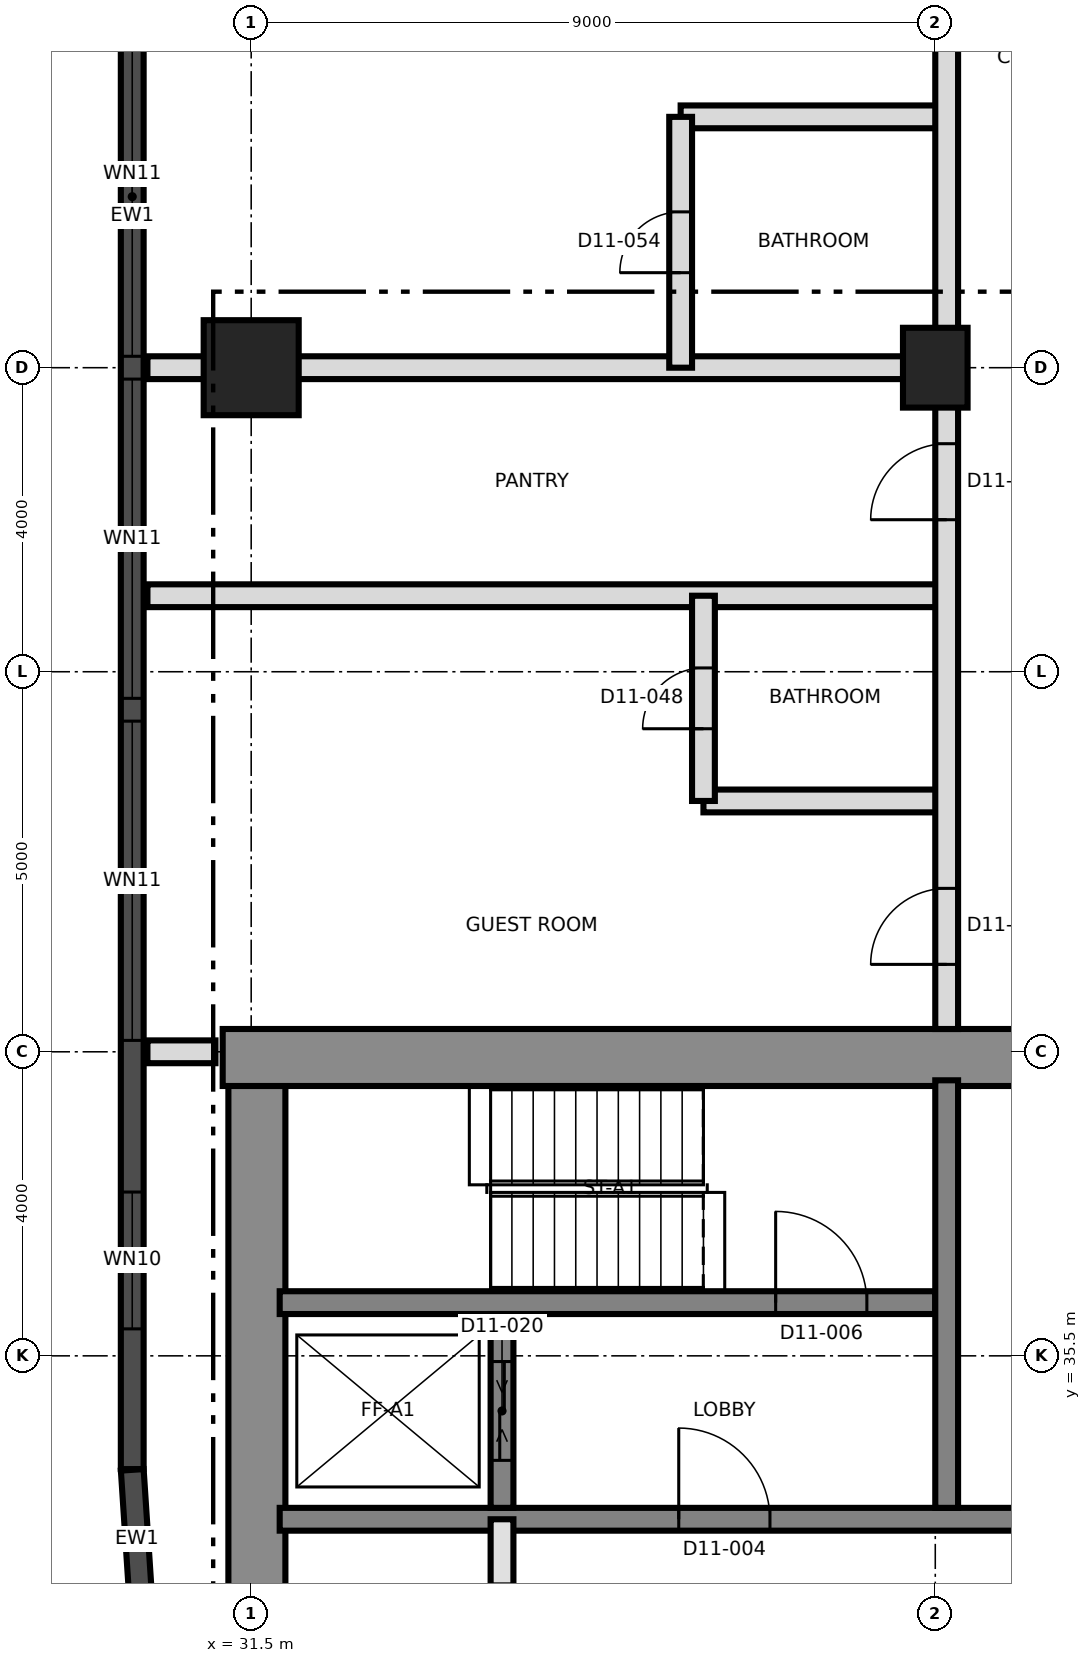
"""IFC4 building model, lengths in metres.
Left out: names, types, materials, properties, quantities, classifications, styles, units other than length and angle.
Written with IfcOpenShell. Run it as: python <this file> out.ifc"""

import sys

from ifc_helpers import new_model, si_unit, direction, frame, frame_2d, origin, origin_2d, place, context, subcontext, project, spatial, rectangle, extrude, element, fill, save


model = new_model("IFC4")
c1 = context("Model", 3, precision=1e-05, world=origin(), true_north=direction((0.0, 1.0)))
c2 = subcontext(c1, "Body", "Model", "MODEL_VIEW")
j1 = project(units=[si_unit("LENGTHUNIT", "METRE"), si_unit("PLANEANGLEUNIT", "RADIAN")], contexts=[c1])
p1 = place(None, origin())
s1 = spatial("IfcSite", under=j1, at=p1, CompositionType="ELEMENT")
p2 = place(p1, origin())
s2 = spatial("IfcBuilding", under=s1, at=p2, CompositionType="ELEMENT")
p3 = place(p2, frame((0.0, 0.0, 131.5)))
s3 = spatial("IfcBuildingStorey", under=s2, at=p3, CompositionType="ELEMENT", Elevation=131.5)
p4 = place(p3, frame((31.575, 21.875, 0.0), z_axis=(0.0, 0.0, 1.0), x_axis=(0.0, 1.0, 0.0)))
e1 = element("IfcWall", 1, at=p4, inside=s3, PredefinedType="SHEAR", context=c2, shape_type="SweptSolid", body=[
    extrude(rectangle(XDim=17.25, YDim=0.75, at=frame_2d((8.625, 0.0))), origin(), (0.0, 0.0, 1.0), 3.7),
])
p5 = place(p3, frame((31.125, 39.425, 0.0), z_axis=(0.0, 0.0, 1.0), x_axis=(1.0, 0.0, 0.0)))
e2 = element("IfcWall", 2, at=p5, inside=s3, PredefinedType="SHEAR", context=c2, shape_type="SweptSolid", body=[
    extrude(rectangle(XDim=27.0, YDim=0.75, at=frame_2d((13.5, 0.0))), origin(), (0.0, 0.0, 1.0), 3.7),
])
p6 = place(p5, frame((10.575, 0.0, 0.0)))
e3 = element("IfcOpeningElement", 3, at=p6, cuts=e2, PredefinedType="OPENING", context=c2, shape_type="SweptSolid", body=[
    extrude(rectangle(XDim=1.2, YDim=2.1, at=frame_2d((0.6, 1.05))), frame((0.0, 0.385, 0.0), z_axis=(0.0, -1.0, 0.0), x_axis=(1.0, 0.0, 0.0)), (0.0, 0.0, 1.0), 0.77),
])
p7 = place(p3, frame((31.875, 33.35, 0.0), z_axis=(0.0, 0.0, 1.0), x_axis=(1.0, 0.0, 0.0)))
e4 = element("IfcWall", 4, at=p7, inside=s3, PredefinedType="SHEAR", context=c2, shape_type="SweptSolid", body=[
    extrude(rectangle(XDim=26.25, YDim=0.3, at=frame_2d((13.125, 0.0))), origin(), (0.0, 0.0, 1.0), 3.7),
])
p8 = place(p7, frame((13.2, 0.0, 0.0)))
e5 = element("IfcOpeningElement", 5, at=p8, cuts=e4, PredefinedType="OPENING", context=c2, shape_type="SweptSolid", body=[
    extrude(rectangle(XDim=1.4, YDim=2.1, at=frame_2d((0.7, 1.05))), frame((0.0, 0.16, 0.0), z_axis=(0.0, -1.0, 0.0), x_axis=(1.0, 0.0, 0.0)), (0.0, 0.0, 1.0), 0.32),
])
p9 = place(p7, frame((5.25, 0.0, 0.0)))
e6 = element("IfcOpeningElement", 6, at=p9, cuts=e4, PredefinedType="OPENING", context=c2, shape_type="SweptSolid", body=[
    extrude(rectangle(XDim=1.2, YDim=2.1, at=frame_2d((0.6, 1.05))), frame((0.0, 0.16, 0.0), z_axis=(0.0, -1.0, 0.0), x_axis=(1.0, 0.0, 0.0)), (0.0, 0.0, 1.0), 0.32),
])
p10 = place(p7, frame((19.8, 0.0, 0.0)))
e7 = element("IfcOpeningElement", 7, at=p10, cuts=e4, PredefinedType="OPENING", context=c2, shape_type="SweptSolid", body=[
    extrude(rectangle(XDim=1.2, YDim=2.1, at=frame_2d((0.6, 1.05))), frame((0.0, 0.16, 0.0), z_axis=(0.0, -1.0, 0.0), x_axis=(1.0, 0.0, 0.0)), (0.0, 0.0, 1.0), 0.32),
])
p11 = place(p3, frame((31.875, 36.2, 0.0), z_axis=(0.0, 0.0, 1.0), x_axis=(1.0, 0.0, 0.0)))
e8 = element("IfcWall", 8, at=p11, inside=s3, PredefinedType="SHEAR", context=c2, shape_type="SweptSolid", body=[
    extrude(rectangle(XDim=8.625, YDim=0.3, at=frame_2d((4.312, 0.0))), origin(), (0.0, 0.0, 1.0), 3.7),
])
p12 = place(p11, frame((6.525, 0.0, 0.0)))
e9 = element("IfcOpeningElement", 9, at=p12, cuts=e8, PredefinedType="OPENING", context=c2, shape_type="SweptSolid", body=[
    extrude(rectangle(XDim=1.2, YDim=2.1, at=frame_2d((0.6, 1.05))), frame((0.0, 0.16, 0.0), z_axis=(0.0, -1.0, 0.0), x_axis=(1.0, 0.0, 0.0)), (0.0, 0.0, 1.0), 0.32),
])
p13 = place(p3, frame((40.65, 33.5, 0.0), z_axis=(0.0, 0.0, 1.0), x_axis=(0.0, 1.0, 0.0)))
e10 = element("IfcWall", 10, at=p13, inside=s3, PredefinedType="SHEAR", context=c2, shape_type="SweptSolid", body=[
    extrude(rectangle(XDim=5.625, YDim=0.3, at=frame_2d((2.812, 0.0))), origin(), (0.0, 0.0, 1.0), 3.7),
])
p14 = place(p3, frame((34.8, 33.5, 0.0), z_axis=(0.0, 0.0, 1.0), x_axis=(0.0, 1.0, 0.0)))
e11 = element("IfcWall", 11, at=p14, inside=s3, PredefinedType="SHEAR", context=c2, shape_type="SweptSolid", body=[
    extrude(rectangle(XDim=2.55, YDim=0.3, at=frame_2d((1.275, 0.0))), origin(), (0.0, 0.0, 1.0), 3.7),
])
p15 = place(p14, frame((0.625, 0.0, 0.0)))
e12 = element("IfcOpeningElement", 12, at=p15, cuts=e11, PredefinedType="OPENING", context=c2, shape_type="SweptSolid", body=[
    extrude(rectangle(XDim=1.3, YDim=2.4, at=frame_2d((0.65, 1.2))), frame((0.0, 0.16, 0.0), z_axis=(0.0, -1.0, 0.0), x_axis=(1.0, 0.0, 0.0)), (0.0, 0.0, 1.0), 0.32),
])
p16 = place(p3, frame((31.5, 48.5, 0.0), z_axis=(0.0, 0.0, 1.0), x_axis=(1.0, 0.0, 0.0)))
e13 = element("IfcColumn", 13, at=p16, inside=s3, PredefinedType="COLUMN", context=c2, shape_type="SweptSolid", body=[
    extrude(rectangle(XDim=1.25, YDim=1.25, at=origin_2d()), origin(), (0.0, 0.0, 1.0), 3.7),
])
p17 = place(p3, frame((40.5, 48.5, 0.0), z_axis=(0.0, 0.0, 1.0), x_axis=(0.0, 1.0, 0.0)))
e14 = element("IfcColumn", 14, at=p17, inside=s3, PredefinedType="COLUMN", context=c2, shape_type="SweptSolid", body=[
    extrude(rectangle(XDim=1.05, YDim=0.85, at=origin_2d()), origin(), (0.0, 0.0, 1.0), 3.7),
])
p18 = place(p3, frame((29.935, 66.986, 0.0), z_axis=(0.0, 0.0, 1.0), x_axis=(0.0, -1.0, 0.0)))
e15 = element("IfcWall", 15, at=p18, inside=s3, PredefinedType="SOLIDWALL", context=c2, shape_type="SweptSolid", body=[
    extrude(rectangle(XDim=32.976, YDim=0.3, at=frame_2d((16.488, 0.0))), origin(), (0.0, 0.0, 1.0), 3.4),
])
p19 = place(p18, frame((1.593, 0.0, 0.3)))
e16 = element("IfcOpeningElement", 16, at=p19, cuts=e15, PredefinedType="OPENING", context=c2, shape_type="SweptSolid", body=[
    extrude(rectangle(XDim=1.8, YDim=2.4, at=frame_2d((0.9, 1.2))), frame((0.0, 0.16, 0.0), z_axis=(0.0, -1.0, 0.0), x_axis=(1.0, 0.0, 0.0)), (0.0, 0.0, 1.0), 0.32),
])
p20 = place(p18, frame((5.136, 0.0, 0.9)))
e17 = element("IfcOpeningElement", 17, at=p20, cuts=e15, PredefinedType="OPENING", context=c2, shape_type="SweptSolid", body=[
    extrude(rectangle(XDim=4.2, YDim=1.5, at=frame_2d((2.1, 0.75))), frame((0.0, 0.16, 0.0), z_axis=(0.0, -1.0, 0.0), x_axis=(1.0, 0.0, 0.0)), (0.0, 0.0, 1.0), 0.32),
])
p21 = place(p18, frame((9.636, 0.0, 0.9)))
e18 = element("IfcOpeningElement", 18, at=p21, cuts=e15, PredefinedType="OPENING", context=c2, shape_type="SweptSolid", body=[
    extrude(rectangle(XDim=4.2, YDim=1.5, at=frame_2d((2.1, 0.75))), frame((0.0, 0.16, 0.0), z_axis=(0.0, -1.0, 0.0), x_axis=(1.0, 0.0, 0.0)), (0.0, 0.0, 1.0), 0.32),
])
p22 = place(p18, frame((14.136, 0.0, 0.9)))
e19 = element("IfcOpeningElement", 19, at=p22, cuts=e15, PredefinedType="OPENING", context=c2, shape_type="SweptSolid", body=[
    extrude(rectangle(XDim=4.2, YDim=1.5, at=frame_2d((2.1, 0.75))), frame((0.0, 0.16, 0.0), z_axis=(0.0, -1.0, 0.0), x_axis=(1.0, 0.0, 0.0)), (0.0, 0.0, 1.0), 0.32),
])
p23 = place(p18, frame((18.636, 0.0, 0.9)))
e20 = element("IfcOpeningElement", 20, at=p23, cuts=e15, PredefinedType="OPENING", context=c2, shape_type="SweptSolid", body=[
    extrude(rectangle(XDim=4.2, YDim=1.5, at=frame_2d((2.1, 0.75))), frame((0.0, 0.16, 0.0), z_axis=(0.0, -1.0, 0.0), x_axis=(1.0, 0.0, 0.0)), (0.0, 0.0, 1.0), 0.32),
])
p24 = place(p18, frame((23.136, 0.0, 0.9)))
e21 = element("IfcOpeningElement", 21, at=p24, cuts=e15, PredefinedType="OPENING", context=c2, shape_type="SweptSolid", body=[
    extrude(rectangle(XDim=4.2, YDim=1.5, at=frame_2d((2.1, 0.75))), frame((0.0, 0.16, 0.0), z_axis=(0.0, -1.0, 0.0), x_axis=(1.0, 0.0, 0.0)), (0.0, 0.0, 1.0), 0.32),
])
p25 = place(p18, frame((29.331, 0.0, 0.3)))
e22 = element("IfcOpeningElement", 22, at=p25, cuts=e15, PredefinedType="OPENING", context=c2, shape_type="SweptSolid", body=[
    extrude(rectangle(XDim=1.8, YDim=2.4, at=frame_2d((0.9, 1.2))), frame((0.0, 0.16, 0.0), z_axis=(0.0, -1.0, 0.0), x_axis=(1.0, 0.0, 0.0)), (0.0, 0.0, 1.0), 0.32),
])
p26 = place(p3, frame((29.935, 34.0, 0.0), z_axis=(0.0, 0.0, 1.0), x_axis=(0.065376617685, -0.997860660543, 0.0)))
e23 = element("IfcWall", 23, at=p26, inside=s3, PredefinedType="SOLIDWALL", context=c2, shape_type="SweptSolid", body=[
    extrude(rectangle(XDim=1.83, YDim=0.3, at=frame_2d((0.915, 0.0))), origin(), (0.0, 0.0, 1.0), 3.4),
])
p27 = place(p3, frame((34.8, 27.9, 0.0), z_axis=(0.0, 0.0, 1.0), x_axis=(0.0, 1.0, 0.0)))
e24 = element("IfcWall", 24, at=p27, inside=s3, PredefinedType="SOLIDWALL", context=c2, shape_type="SweptSolid", body=[
    extrude(rectangle(XDim=5.45, YDim=0.3, at=frame_2d((2.725, 0.0))), origin(), (0.0, 0.0, 1.0), 3.4),
])
p28 = place(p27, frame((3.6, 0.0, 0.0)))
e25 = element("IfcOpeningElement", 25, at=p28, cuts=e24, PredefinedType="OPENING", context=c2, shape_type="SweptSolid", body=[
    extrude(rectangle(XDim=1.0, YDim=2.1, at=frame_2d((0.5, 1.05))), frame((0.0, 0.16, 0.0), z_axis=(0.0, -1.0, 0.0), x_axis=(1.0, 0.0, 0.0)), (0.0, 0.0, 1.0), 0.32),
])
p29 = place(p3, frame((30.135, 39.5, 0.0), z_axis=(0.0, 0.0, 1.0), x_axis=(1.0, 0.0, 0.0)))
e26 = element("IfcWall", 26, at=p29, inside=s3, PredefinedType="PARTITIONING", context=c2, shape_type="SweptSolid", body=[
    extrude(rectangle(XDim=0.895, YDim=0.3, at=frame_2d((0.448, 0.0))), origin(), (0.0, 0.0, 1.0), 3.35),
])
p30 = place(p3, frame((37.45, 42.8, 0.0), z_axis=(0.0, 0.0, 1.0), x_axis=(1.0, 0.0, 0.0)))
e27 = element("IfcWall", 27, at=p30, inside=s3, PredefinedType="PARTITIONING", context=c2, shape_type="SweptSolid", body=[
    extrude(rectangle(XDim=3.2, YDim=0.3, at=frame_2d((1.6, 0.0))), origin(), (0.0, 0.0, 1.0), 3.4),
])
for number, where, z_axis, x_axis in (
    (28, (30.135, 45.5, 0.0), (0.0, 0.0, 1.0), (1.0, 0.0, 0.0)),
    (29, (30.135, 48.5, 0.0), (0.0, 0.0, 1.0), (1.0, 0.0, 0.0)),
):
    element("IfcWall", number, at=place(p3, frame(where, z_axis=z_axis, x_axis=x_axis)), inside=s3, PredefinedType="PARTITIONING", context=c2, shape_type="SweptSolid", body=[
        extrude(rectangle(XDim=10.515, YDim=0.3, at=frame_2d((5.257, 0.0))), origin(), (0.0, 0.0, 1.0), 3.35),
    ])
p31 = place(p3, frame((37.15, 51.8, 0.0), z_axis=(0.0, 0.0, 1.0), x_axis=(1.0, 0.0, 0.0)))
e30 = element("IfcWall", 30, at=p31, inside=s3, PredefinedType="PARTITIONING", context=c2, shape_type="SweptSolid", body=[
    extrude(rectangle(XDim=3.5, YDim=0.3, at=frame_2d((1.75, 0.0))), origin(), (0.0, 0.0, 1.0), 3.4),
])
p32 = place(p3, frame((37.15, 48.5, 0.0), z_axis=(0.0, 0.0, 1.0), x_axis=(0.0, 1.0, 0.0)))
e31 = element("IfcWall", 31, at=p32, inside=s3, PredefinedType="PARTITIONING", context=c2, shape_type="SweptSolid", body=[
    extrude(rectangle(XDim=3.3, YDim=0.3, at=frame_2d((1.65, 0.0))), origin(), (0.0, 0.0, 1.0), 3.4),
])
p33 = place(p32, frame((1.25, 0.0, 0.0)))
e32 = element("IfcOpeningElement", 32, at=p33, cuts=e31, PredefinedType="OPENING", context=c2, shape_type="SweptSolid", body=[
    extrude(rectangle(XDim=0.8, YDim=2.1, at=frame_2d((0.4, 1.05))), frame((0.0, 0.16, 0.0), z_axis=(0.0, -1.0, 0.0), x_axis=(1.0, 0.0, 0.0)), (0.0, 0.0, 1.0), 0.32),
])
p34 = place(p3, frame((37.45, 42.8, 0.0), z_axis=(0.0, 0.0, 1.0), x_axis=(0.0, 1.0, 0.0)))
e33 = element("IfcWall", 33, at=p34, inside=s3, PredefinedType="PARTITIONING", context=c2, shape_type="SweptSolid", body=[
    extrude(rectangle(XDim=2.7, YDim=0.3, at=frame_2d((1.35, 0.0))), origin(), (0.0, 0.0, 1.0), 3.4),
])
p35 = place(p34, frame((0.95, 0.0, 0.0)))
e34 = element("IfcOpeningElement", 34, at=p35, cuts=e33, PredefinedType="OPENING", context=c2, shape_type="SweptSolid", body=[
    extrude(rectangle(XDim=0.8, YDim=2.1, at=frame_2d((0.4, 1.05))), frame((0.0, 0.16, 0.0), z_axis=(0.0, -1.0, 0.0), x_axis=(1.0, 0.0, 0.0)), (0.0, 0.0, 1.0), 0.32),
])
p36 = place(p3, frame((40.65, 39.8, 0.0), z_axis=(0.0, 0.0, 1.0), x_axis=(0.0, 1.0, 0.0)))
e35 = element("IfcWall", 35, at=p36, inside=s3, PredefinedType="PARTITIONING", context=c2, shape_type="SweptSolid", body=[
    extrude(rectangle(XDim=37.305, YDim=0.3, at=frame_2d((18.652, 0.0))), origin(), (0.0, 0.0, 1.0), 3.35),
])
p37 = place(p36, frame((0.85, 0.0, 0.0)))
e36 = element("IfcOpeningElement", 36, at=p37, cuts=e35, PredefinedType="OPENING", context=c2, shape_type="SweptSolid", body=[
    extrude(rectangle(XDim=1.0, YDim=2.1, at=frame_2d((0.5, 1.05))), frame((0.0, 0.16, 0.0), z_axis=(0.0, -1.0, 0.0), x_axis=(1.0, 0.0, 0.0)), (0.0, 0.0, 1.0), 0.32),
])
p38 = place(p36, frame((6.7, 0.0, 0.0)))
e37 = element("IfcOpeningElement", 37, at=p38, cuts=e35, PredefinedType="OPENING", context=c2, shape_type="SweptSolid", body=[
    extrude(rectangle(XDim=1.0, YDim=2.1, at=frame_2d((0.5, 1.05))), frame((0.0, 0.16, 0.0), z_axis=(0.0, -1.0, 0.0), x_axis=(1.0, 0.0, 0.0)), (0.0, 0.0, 1.0), 0.32),
])
p39 = place(p36, frame((14.35, 0.0, 0.0)))
e38 = element("IfcOpeningElement", 38, at=p39, cuts=e35, PredefinedType="OPENING", context=c2, shape_type="SweptSolid", body=[
    extrude(rectangle(XDim=1.0, YDim=2.4, at=frame_2d((0.5, 1.2))), frame((0.0, 0.16, 0.0), z_axis=(0.0, -1.0, 0.0), x_axis=(1.0, 0.0, 0.0)), (0.0, 0.0, 1.0), 0.32),
])
p40 = place(p36, frame((21.2, 0.0, 0.0)))
e39 = element("IfcOpeningElement", 39, at=p40, cuts=e35, PredefinedType="OPENING", context=c2, shape_type="SweptSolid", body=[
    extrude(rectangle(XDim=1.0, YDim=2.4, at=frame_2d((0.5, 1.2))), frame((0.0, 0.16, 0.0), z_axis=(0.0, -1.0, 0.0), x_axis=(1.0, 0.0, 0.0)), (0.0, 0.0, 1.0), 0.32),
])
p41 = place(p22, origin())
e40 = element("IfcWindow", 40, at=p41, inside=s3, PartitioningType="SINGLE_PANEL", PredefinedType="WINDOW", context=c2, shape_type="SweptSolid", body=[
    extrude(rectangle(XDim=4.2, YDim=1.5, at=frame_2d((2.1, 0.75))), frame((0.0, 0.03, 0.0), z_axis=(0.0, -1.0, 0.0), x_axis=(1.0, 0.0, 0.0)), (0.0, 0.0, 1.0), 0.06),
])
fill(e19, e40)
p42 = place(p23, origin())
e41 = element("IfcWindow", 41, at=p42, inside=s3, PartitioningType="SINGLE_PANEL", PredefinedType="WINDOW", context=c2, shape_type="SweptSolid", body=[
    extrude(rectangle(XDim=4.2, YDim=1.5, at=frame_2d((2.1, 0.75))), frame((0.0, 0.03, 0.0), z_axis=(0.0, -1.0, 0.0), x_axis=(1.0, 0.0, 0.0)), (0.0, 0.0, 1.0), 0.06),
])
fill(e20, e41)
p43 = place(p24, origin())
e42 = element("IfcWindow", 42, at=p43, inside=s3, PartitioningType="SINGLE_PANEL", PredefinedType="WINDOW", context=c2, shape_type="SweptSolid", body=[
    extrude(rectangle(XDim=4.2, YDim=1.5, at=frame_2d((2.1, 0.75))), frame((0.0, 0.03, 0.0), z_axis=(0.0, -1.0, 0.0), x_axis=(1.0, 0.0, 0.0)), (0.0, 0.0, 1.0), 0.06),
])
fill(e21, e42)
p44 = place(p25, origin())
e43 = element("IfcWindow", 43, at=p44, inside=s3, PartitioningType="SINGLE_PANEL", PredefinedType="WINDOW", context=c2, shape_type="SweptSolid", body=[
    extrude(rectangle(XDim=1.8, YDim=2.4, at=frame_2d((0.9, 1.2))), frame((0.0, 0.03, 0.0), z_axis=(0.0, -1.0, 0.0), x_axis=(1.0, 0.0, 0.0)), (0.0, 0.0, 1.0), 0.06),
])
fill(e22, e43)
p45 = place(p9, origin())
e44 = element("IfcDoor", 44, at=p45, inside=s3, OperationType="SINGLE_SWING_LEFT", PredefinedType="DOOR", context=c2, shape_type="SweptSolid", body=[
    extrude(rectangle(XDim=1.2, YDim=2.1, at=frame_2d((0.6, 1.05))), frame((0.0, 0.025, 0.0), z_axis=(0.0, -1.0, 0.0), x_axis=(1.0, 0.0, 0.0)), (0.0, 0.0, 1.0), 0.05),
])
fill(e6, e44)
p46 = place(p12, origin())
e45 = element("IfcDoor", 45, at=p46, inside=s3, OperationType="SINGLE_SWING_RIGHT", PredefinedType="DOOR", context=c2, shape_type="SweptSolid", body=[
    extrude(rectangle(XDim=1.2, YDim=2.1, at=frame_2d((0.6, 1.05))), frame((0.0, 0.025, 0.0), z_axis=(0.0, -1.0, 0.0), x_axis=(1.0, 0.0, 0.0)), (0.0, 0.0, 1.0), 0.05),
])
fill(e9, e45)
p47 = place(p15, origin())
e46 = element("IfcDoor", 46, at=p47, inside=s3, OperationType="SLIDING_TO_LEFT", PredefinedType="DOOR", context=c2, shape_type="SweptSolid", body=[
    extrude(rectangle(XDim=1.3, YDim=2.4, at=frame_2d((0.65, 1.2))), frame((0.0, 0.025, 0.0), z_axis=(0.0, -1.0, 0.0), x_axis=(1.0, 0.0, 0.0)), (0.0, 0.0, 1.0), 0.05),
])
fill(e12, e46)
p48 = place(p35, origin())
e47 = element("IfcDoor", 47, at=p48, inside=s3, OperationType="SINGLE_SWING_LEFT", PredefinedType="DOOR", context=c2, shape_type="SweptSolid", body=[
    extrude(rectangle(XDim=0.8, YDim=2.1, at=frame_2d((0.4, 1.05))), frame((0.0, 0.025, 0.0), z_axis=(0.0, -1.0, 0.0), x_axis=(1.0, 0.0, 0.0)), (0.0, 0.0, 1.0), 0.05),
])
fill(e34, e47)
p49 = place(p37, origin())
e48 = element("IfcDoor", 48, at=p49, inside=s3, OperationType="SINGLE_SWING_LEFT", PredefinedType="DOOR", context=c2, shape_type="SweptSolid", body=[
    extrude(rectangle(XDim=1.0, YDim=2.1, at=frame_2d((0.5, 1.05))), frame((0.0, 0.025, 0.0), z_axis=(0.0, -1.0, 0.0), x_axis=(1.0, 0.0, 0.0)), (0.0, 0.0, 1.0), 0.05),
])
fill(e36, e48)
p50 = place(p38, origin())
e49 = element("IfcDoor", 49, at=p50, inside=s3, OperationType="SINGLE_SWING_RIGHT", PredefinedType="DOOR", context=c2, shape_type="SweptSolid", body=[
    extrude(rectangle(XDim=1.0, YDim=2.1, at=frame_2d((0.5, 1.05))), frame((0.0, 0.025, 0.0), z_axis=(0.0, -1.0, 0.0), x_axis=(1.0, 0.0, 0.0)), (0.0, 0.0, 1.0), 0.05),
])
fill(e37, e49)
p51 = place(p33, origin())
e50 = element("IfcDoor", 50, at=p51, inside=s3, OperationType="SINGLE_SWING_LEFT", PredefinedType="DOOR", context=c2, shape_type="SweptSolid", body=[
    extrude(rectangle(XDim=0.8, YDim=2.1, at=frame_2d((0.4, 1.05))), frame((0.0, 0.025, 0.0), z_axis=(0.0, -1.0, 0.0), x_axis=(1.0, 0.0, 0.0)), (0.0, 0.0, 1.0), 0.05),
])
fill(e32, e50)
save(model, sys.argv[1])
